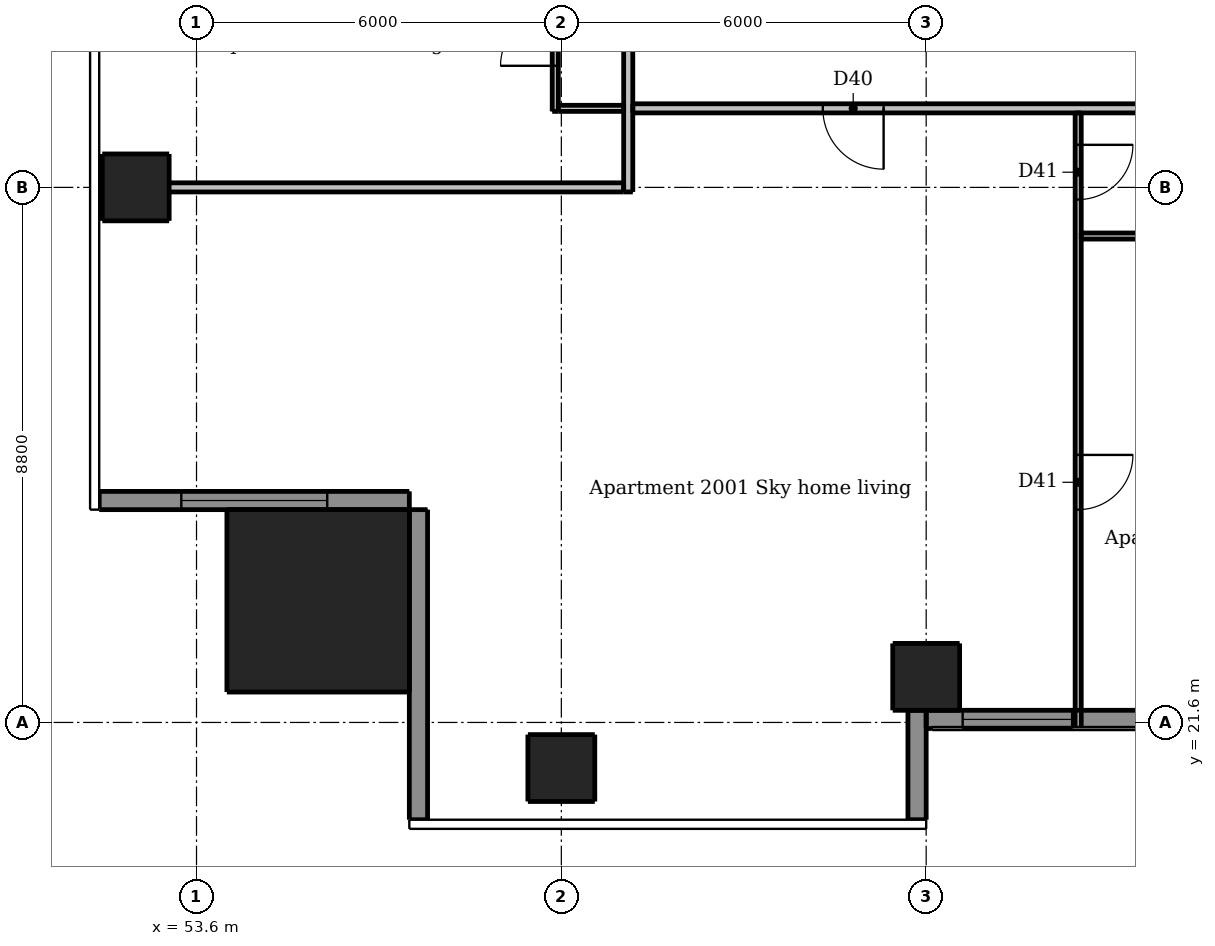
"""IFC4 building model, lengths in metres.
Left out: names, types, materials, properties, quantities, classifications, styles, units other than length and angle.
Written with IfcOpenShell. Run it as: python <this file> out.ifc"""

import sys

from ifc_helpers import new_model, si_unit, direction, frame, frame_2d, origin, origin_2d, place, context, subcontext, project, spatial, rectangle, extrude, element, fill, save


model = new_model("IFC4")
c1 = context("Model", 3, precision=1e-05, world=origin(), true_north=direction((0.0, 1.0)))
c2 = subcontext(c1, "Body", "Model", "MODEL_VIEW")
j1 = project(units=[si_unit("LENGTHUNIT", "METRE"), si_unit("PLANEANGLEUNIT", "RADIAN")], contexts=[c1])
p1 = place(None, origin())
s1 = spatial("IfcSite", under=j1, at=p1, CompositionType="ELEMENT")
p2 = place(p1, origin())
s2 = spatial("IfcBuilding", under=s1, at=p2, CompositionType="ELEMENT")
p3 = place(p2, frame((0.0, 0.0, 78.7)))
s3 = spatial("IfcBuildingStorey", under=s2, at=p3, CompositionType="ELEMENT", Elevation=78.7)
for number, where, z_axis, x_axis in (
    (1, (59.6, 20.85, 0.0), (0.0, 0.0, 1.0), (1.0, 0.0, 0.0)),
    (2, (65.6, 22.35, 0.0), (0.0, 0.0, 1.0), (1.0, 0.0, 0.0)),
    (3, (52.6, 30.4, 0.0), (0.0, 0.0, 1.0), (1.0, 0.0, 0.0)),
):
    element("IfcColumn", number, at=place(p3, frame(where, z_axis=z_axis, x_axis=x_axis)), inside=s3, PredefinedType="COLUMN", context=c2, shape_type="SweptSolid", body=[
        extrude(rectangle(XDim=1.1, YDim=1.1, at=origin_2d()), origin(), (0.0, 0.0, 1.0), 3.05),
    ])
p4 = place(p3, frame((55.6, 23.6, 0.0), z_axis=(0.0, 0.0, 1.0), x_axis=(1.0, 0.0, 0.0)))
e4 = element("IfcColumn", 4, at=p4, inside=s3, PredefinedType="COLUMN", context=c2, shape_type="SweptSolid", body=[
    extrude(rectangle(XDim=3.0, YDim=3.0, at=origin_2d()), origin(), (0.0, 0.0, 1.0), 3.3),
])
p5 = place(p3, frame((65.45, 20.0, 0.0), z_axis=(0.0, 0.0, 1.0), x_axis=(0.0, 1.0, 0.0)))
e5 = element("IfcWall", 5, at=p5, inside=s3, PredefinedType="SOLIDWALL", context=c2, shape_type="SweptSolid", body=[
    extrude(rectangle(XDim=1.8, YDim=0.3, at=frame_2d((0.9, 0.0))), origin(), (0.0, 0.0, 1.0), 3.05),
])
p6 = place(p3, frame((52.0, 25.25, 0.0), z_axis=(0.0, 0.0, 1.0), x_axis=(1.0, 0.0, 0.0)))
e6 = element("IfcWall", 6, at=p6, inside=s3, PredefinedType="SOLIDWALL", context=c2, shape_type="SweptSolid", body=[
    extrude(rectangle(XDim=5.1, YDim=0.3, at=frame_2d((2.55, 0.0))), origin(), (0.0, 0.0, 1.0), 3.05),
])
p7 = place(p6, frame((1.35, 0.0, 0.15)))
e7 = element("IfcOpeningElement", 7, at=p7, cuts=e6, PredefinedType="OPENING", context=c2, shape_type="SweptSolid", body=[
    extrude(rectangle(XDim=2.4, YDim=2.1, at=frame_2d((1.2, 1.05))), frame((0.0, 0.16, 0.0), z_axis=(0.0, -1.0, 0.0), x_axis=(1.0, 0.0, 0.0)), (0.0, 0.0, 1.0), 0.32),
])
p8 = place(p3, frame((57.25, 25.1, 0.0), z_axis=(0.0, 0.0, 1.0), x_axis=(0.0, -1.0, 0.0)))
e8 = element("IfcWall", 8, at=p8, inside=s3, PredefinedType="SOLIDWALL", context=c2, shape_type="SweptSolid", body=[
    extrude(rectangle(XDim=5.1, YDim=0.3, at=frame_2d((2.55, 0.0))), origin(), (0.0, 0.0, 1.0), 3.05),
])
p9 = place(p3, frame((65.6, 21.65, 0.0), z_axis=(0.0, 0.0, 1.0), x_axis=(1.0, 0.0, 0.0)))
e9 = element("IfcWall", 9, at=p9, inside=s3, PredefinedType="SOLIDWALL", context=c2, shape_type="SweptSolid", body=[
    extrude(rectangle(XDim=6.0, YDim=0.3, at=frame_2d((3.0, 0.0))), origin(), (0.0, 0.0, 1.0), 3.05),
])
p10 = place(p9, frame((0.6, 0.0, 0.15)))
e10 = element("IfcOpeningElement", 10, at=p10, cuts=e9, PredefinedType="OPENING", context=c2, shape_type="SweptSolid", body=[
    extrude(rectangle(XDim=1.8, YDim=2.1, at=frame_2d((0.9, 1.05))), frame((0.0, 0.16, 0.0), z_axis=(0.0, -1.0, 0.0), x_axis=(1.0, 0.0, 0.0)), (0.0, 0.0, 1.0), 0.32),
])
p11 = place(p9, frame((3.6, 0.0, 0.15)))
e11 = element("IfcOpeningElement", 11, at=p11, cuts=e9, PredefinedType="OPENING", context=c2, shape_type="SweptSolid", body=[
    extrude(rectangle(XDim=1.8, YDim=2.1, at=frame_2d((0.9, 1.05))), frame((0.0, 0.16, 0.0), z_axis=(0.0, -1.0, 0.0), x_axis=(1.0, 0.0, 0.0)), (0.0, 0.0, 1.0), 0.32),
])
p12 = place(p3, frame((59.5, 31.65, 0.0), z_axis=(0.0, 0.0, 1.0), x_axis=(0.0, 1.0, 0.0)))
e12 = element("IfcWall", 12, at=p12, inside=s3, PredefinedType="PARTITIONING", context=c2, shape_type="SweptSolid", body=[
    extrude(rectangle(XDim=16.675, YDim=0.1, at=frame_2d((8.337, 0.0))), origin(), (0.0, 0.0, 1.0), 2.51),
])
p13 = place(p12, frame((0.75, 0.0, 0.0)))
e13 = element("IfcOpeningElement", 13, at=p13, cuts=e12, PredefinedType="OPENING", context=c2, shape_type="SweptSolid", body=[
    extrude(rectangle(XDim=0.9, YDim=2.1, at=frame_2d((0.45, 1.05))), frame((0.0, 0.06, 0.0), z_axis=(0.0, -1.0, 0.0), x_axis=(1.0, 0.0, 0.0)), (0.0, 0.0, 1.0), 0.12),
])
p14 = place(p12, frame((3.1, 0.0, 0.0)))
e14 = element("IfcOpeningElement", 14, at=p14, cuts=e12, PredefinedType="OPENING", context=c2, shape_type="SweptSolid", body=[
    extrude(rectangle(XDim=0.9, YDim=2.1, at=frame_2d((0.45, 1.05))), frame((0.0, 0.06, 0.0), z_axis=(0.0, -1.0, 0.0), x_axis=(1.0, 0.0, 0.0)), (0.0, 0.0, 1.0), 0.12),
])
p15 = place(p12, frame((8.5, 0.0, 0.0)))
e15 = element("IfcOpeningElement", 15, at=p15, cuts=e12, PredefinedType="OPENING", context=c2, shape_type="SweptSolid", body=[
    extrude(rectangle(XDim=0.9, YDim=2.1, at=frame_2d((0.45, 1.05))), frame((0.0, 0.06, 0.0), z_axis=(0.0, -1.0, 0.0), x_axis=(1.0, 0.0, 0.0)), (0.0, 0.0, 1.0), 0.12),
])
p16 = place(p12, frame((14.5, 0.0, 0.0)))
e16 = element("IfcOpeningElement", 16, at=p16, cuts=e12, PredefinedType="OPENING", context=c2, shape_type="SweptSolid", body=[
    extrude(rectangle(XDim=0.9, YDim=2.1, at=frame_2d((0.45, 1.05))), frame((0.0, 0.06, 0.0), z_axis=(0.0, -1.0, 0.0), x_axis=(1.0, 0.0, 0.0)), (0.0, 0.0, 1.0), 0.12),
])
p17 = place(p12, frame((5.55, 0.0, 0.0)))
e17 = element("IfcOpeningElement", 17, at=p17, cuts=e12, PredefinedType="OPENING", context=c2, shape_type="SweptSolid", body=[
    extrude(rectangle(XDim=0.8, YDim=2.1, at=frame_2d((0.4, 1.05))), frame((0.0, 0.06, 0.0), z_axis=(0.0, -1.0, 0.0), x_axis=(1.0, 0.0, 0.0)), (0.0, 0.0, 1.0), 0.12),
])
p18 = place(p12, frame((11.55, 0.0, 0.0)))
e18 = element("IfcOpeningElement", 18, at=p18, cuts=e12, PredefinedType="OPENING", context=c2, shape_type="SweptSolid", body=[
    extrude(rectangle(XDim=0.8, YDim=2.1, at=frame_2d((0.4, 1.05))), frame((0.0, 0.06, 0.0), z_axis=(0.0, -1.0, 0.0), x_axis=(1.0, 0.0, 0.0)), (0.0, 0.0, 1.0), 0.12),
])
p19 = place(p3, frame((68.1, 31.625, 0.0), z_axis=(0.0, 0.0, 1.0), x_axis=(0.0, -1.0, 0.0)))
e19 = element("IfcWall", 19, at=p19, inside=s3, PredefinedType="PARTITIONING", context=c2, shape_type="SweptSolid", body=[
    extrude(rectangle(XDim=10.125, YDim=0.1, at=frame_2d((5.062, 0.0))), origin(), (0.0, 0.0, 1.0), 3.05),
])
p20 = place(p19, frame((0.525, 0.0, 0.0)))
e20 = element("IfcOpeningElement", 20, at=p20, cuts=e19, PredefinedType="OPENING", context=c2, shape_type="SweptSolid", body=[
    extrude(rectangle(XDim=0.9, YDim=2.1, at=frame_2d((0.45, 1.05))), frame((0.0, 0.06, 0.0), z_axis=(0.0, -1.0, 0.0), x_axis=(1.0, 0.0, 0.0)), (0.0, 0.0, 1.0), 0.12),
])
p21 = place(p19, frame((5.625, 0.0, 0.0)))
e21 = element("IfcOpeningElement", 21, at=p21, cuts=e19, PredefinedType="OPENING", context=c2, shape_type="SweptSolid", body=[
    extrude(rectangle(XDim=0.9, YDim=2.1, at=frame_2d((0.45, 1.05))), frame((0.0, 0.06, 0.0), z_axis=(0.0, -1.0, 0.0), x_axis=(1.0, 0.0, 0.0)), (0.0, 0.0, 1.0), 0.12),
])
p22 = place(p3, frame((59.55, 31.7, 0.0), z_axis=(0.0, 0.0, 1.0), x_axis=(1.0, 0.0, 0.0)))
e22 = element("IfcWall", 22, at=p22, inside=s3, PredefinedType="PARTITIONING", context=c2, shape_type="SweptSolid", body=[
    extrude(rectangle(XDim=1.075, YDim=0.1, at=frame_2d((0.538, 0.0))), origin(), (0.0, 0.0, 1.0), 3.05),
])
p23 = place(p3, frame((68.15, 29.6, 0.0), z_axis=(0.0, 0.0, 1.0), x_axis=(1.0, 0.0, 0.0)))
e23 = element("IfcWall", 23, at=p23, inside=s3, PredefinedType="PARTITIONING", context=c2, shape_type="SweptSolid", body=[
    extrude(rectangle(XDim=6.475, YDim=0.1, at=frame_2d((3.238, 0.0))), origin(), (0.0, 0.0, 1.0), 3.05),
])
p24 = place(p23, frame((4.05, 0.0, 0.0)))
e24 = element("IfcOpeningElement", 24, at=p24, cuts=e23, PredefinedType="OPENING", context=c2, shape_type="SweptSolid", body=[
    extrude(rectangle(XDim=0.8, YDim=2.1, at=frame_2d((0.4, 1.05))), frame((0.0, 0.06, 0.0), z_axis=(0.0, -1.0, 0.0), x_axis=(1.0, 0.0, 0.0)), (0.0, 0.0, 1.0), 0.12),
])
p25 = place(p3, frame((60.7, 30.325, 0.0), z_axis=(0.0, 0.0, 1.0), x_axis=(0.0, 1.0, 0.0)))
e25 = element("IfcWall", 25, at=p25, inside=s3, PredefinedType="PARTITIONING", context=c2, shape_type="SweptSolid", body=[
    extrude(rectangle(XDim=28.9, YDim=0.15, at=frame_2d((14.45, 0.0))), origin(), (0.0, 0.0, 1.0), 3.05),
])
p26 = place(p25, frame((9.225, 0.0, 0.0)))
e26 = element("IfcOpeningElement", 26, at=p26, cuts=e25, PredefinedType="OPENING", context=c2, shape_type="SweptSolid", body=[
    extrude(rectangle(XDim=1.0, YDim=2.1, at=frame_2d((0.5, 1.05))), frame((0.0, 0.085, 0.0), z_axis=(0.0, -1.0, 0.0), x_axis=(1.0, 0.0, 0.0)), (0.0, 0.0, 1.0), 0.17),
])
p27 = place(p25, frame((26.025, 0.0, 0.0)))
e27 = element("IfcOpeningElement", 27, at=p27, cuts=e25, PredefinedType="OPENING", context=c2, shape_type="SweptSolid", body=[
    extrude(rectangle(XDim=1.0, YDim=2.1, at=frame_2d((0.5, 1.05))), frame((0.0, 0.085, 0.0), z_axis=(0.0, -1.0, 0.0), x_axis=(1.0, 0.0, 0.0)), (0.0, 0.0, 1.0), 0.17),
])
p28 = place(p3, frame((89.525, 31.7, 0.0), z_axis=(0.0, 0.0, 1.0), x_axis=(-1.0, 0.0, 0.0)))
e28 = element("IfcWall", 28, at=p28, inside=s3, PredefinedType="PARTITIONING", context=c2, shape_type="SweptSolid", body=[
    extrude(rectangle(XDim=28.75, YDim=0.15, at=frame_2d((14.375, 0.0))), origin(), (0.0, 0.0, 1.0), 3.05),
])
p29 = place(p28, frame((24.625, 0.0, 0.0)))
e29 = element("IfcOpeningElement", 29, at=p29, cuts=e28, PredefinedType="OPENING", context=c2, shape_type="SweptSolid", body=[
    extrude(rectangle(XDim=1.0, YDim=2.1, at=frame_2d((0.5, 1.05))), frame((0.0, 0.085, 0.0), z_axis=(0.0, -1.0, 0.0), x_axis=(1.0, 0.0, 0.0)), (0.0, 0.0, 1.0), 0.17),
])
p30 = place(p28, frame((7.525, 0.0, 0.0)))
e30 = element("IfcOpeningElement", 30, at=p30, cuts=e28, PredefinedType="OPENING", context=c2, shape_type="SweptSolid", body=[
    extrude(rectangle(XDim=1.0, YDim=2.1, at=frame_2d((0.5, 1.05))), frame((0.0, 0.085, 0.0), z_axis=(0.0, -1.0, 0.0), x_axis=(1.0, 0.0, 0.0)), (0.0, 0.0, 1.0), 0.17),
])
p31 = place(p3, frame((52.0, 30.4, 0.0), z_axis=(0.0, 0.0, 1.0), x_axis=(1.0, 0.0, 0.0)))
e31 = element("IfcWall", 31, at=p31, inside=s3, PredefinedType="PARTITIONING", context=c2, shape_type="SweptSolid", body=[
    extrude(rectangle(XDim=8.625, YDim=0.15, at=frame_2d((4.312, 0.0))), origin(), (0.0, 0.0, 1.0), 2.647),
])
p32 = place(p7, origin())
e32 = element("IfcWindow", 32, at=p32, inside=s3, PartitioningType="DOUBLE_PANEL_VERTICAL", PredefinedType="WINDOW", context=c2, shape_type="SweptSolid", body=[
    extrude(rectangle(XDim=2.4, YDim=2.1, at=frame_2d((1.2, 1.05))), frame((0.0, 0.03, 0.0), z_axis=(0.0, -1.0, 0.0), x_axis=(1.0, 0.0, 0.0)), (0.0, 0.0, 1.0), 0.06),
])
fill(e7, e32)
p33 = place(p10, origin())
e33 = element("IfcWindow", 33, at=p33, inside=s3, PartitioningType="DOUBLE_PANEL_VERTICAL", PredefinedType="WINDOW", context=c2, shape_type="SweptSolid", body=[
    extrude(rectangle(XDim=1.8, YDim=2.1, at=frame_2d((0.9, 1.05))), frame((0.0, 0.03, 0.0), z_axis=(0.0, -1.0, 0.0), x_axis=(1.0, 0.0, 0.0)), (0.0, 0.0, 1.0), 0.06),
])
fill(e10, e33)
p34 = place(p29, origin())
e34 = element("IfcDoor", 34, at=p34, inside=s3, OperationType="SINGLE_SWING_LEFT", PredefinedType="DOOR", context=c2, shape_type="SweptSolid", body=[
    extrude(rectangle(XDim=1.0, YDim=2.1, at=frame_2d((0.5, 1.05))), frame((0.0, 0.025, 0.0), z_axis=(0.0, -1.0, 0.0), x_axis=(1.0, 0.0, 0.0)), (0.0, 0.0, 1.0), 0.05),
])
fill(e29, e34)
p35 = place(p20, origin())
e35 = element("IfcDoor", 35, at=p35, inside=s3, OperationType="SINGLE_SWING_LEFT", PredefinedType="DOOR", context=c2, shape_type="SweptSolid", body=[
    extrude(rectangle(XDim=0.9, YDim=2.1, at=frame_2d((0.45, 1.05))), frame((0.0, 0.025, 0.0), z_axis=(0.0, -1.0, 0.0), x_axis=(1.0, 0.0, 0.0)), (0.0, 0.0, 1.0), 0.05),
])
fill(e20, e35)
p36 = place(p21, origin())
e36 = element("IfcDoor", 36, at=p36, inside=s3, OperationType="SINGLE_SWING_LEFT", PredefinedType="DOOR", context=c2, shape_type="SweptSolid", body=[
    extrude(rectangle(XDim=0.9, YDim=2.1, at=frame_2d((0.45, 1.05))), frame((0.0, 0.025, 0.0), z_axis=(0.0, -1.0, 0.0), x_axis=(1.0, 0.0, 0.0)), (0.0, 0.0, 1.0), 0.05),
])
fill(e21, e36)
p37 = place(p13, origin())
e37 = element("IfcDoor", 37, at=p37, inside=s3, OperationType="SINGLE_SWING_LEFT", PredefinedType="DOOR", context=c2, shape_type="SweptSolid", body=[
    extrude(rectangle(XDim=0.9, YDim=2.1, at=frame_2d((0.45, 1.05))), frame((0.0, 0.025, 0.0), z_axis=(0.0, -1.0, 0.0), x_axis=(1.0, 0.0, 0.0)), (0.0, 0.0, 1.0), 0.05),
])
fill(e13, e37)
save(model, sys.argv[1])
